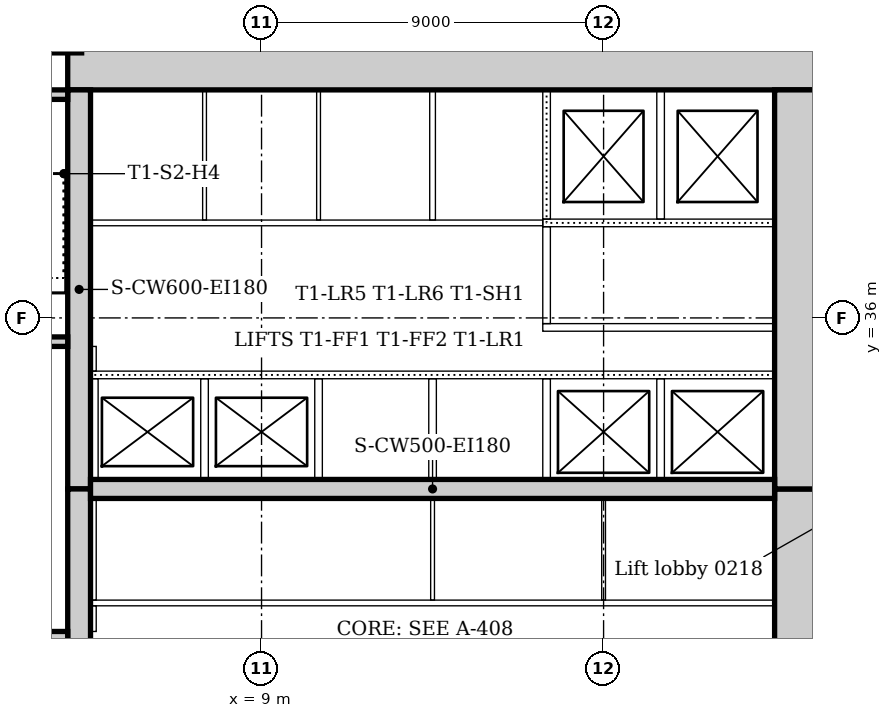
"""IFC4 building model, lengths in metres.
Left out: names, types, materials, properties, quantities, classifications, styles, units other than length and angle.
Written with IfcOpenShell. Run it as: python <this file> out.ifc"""

import sys

from ifc_helpers import new_model, si_unit, direction, frame, frame_2d, origin, origin_2d, place, context, subcontext, project, spatial, rectangle, extrude, element, fill, save


model = new_model("IFC4")
c1 = context("Model", 3, precision=1e-05, world=origin(), true_north=direction((0.0, 1.0)))
c2 = subcontext(c1, "Body", "Model", "MODEL_VIEW")
j1 = project(units=[si_unit("LENGTHUNIT", "METRE"), si_unit("PLANEANGLEUNIT", "RADIAN")], contexts=[c1])
p1 = place(None, origin())
s1 = spatial("IfcSite", under=j1, at=p1, CompositionType="ELEMENT")
p2 = place(p1, origin())
s2 = spatial("IfcBuilding", under=s1, at=p2, CompositionType="ELEMENT")
p3 = place(p2, frame((0.0, 0.0, 11.0)))
s3 = spatial("IfcBuildingStorey", under=s2, at=p3, CompositionType="ELEMENT", Elevation=11.0)
p4 = place(p3, frame((23.7, 42.6, 0.0), z_axis=(0.0, 0.0, 1.0), x_axis=(-1.0, 0.0, 0.0)))
e1 = element("IfcWall", 1, at=p4, inside=s3, PredefinedType="SOLIDWALL", context=c2, shape_type="SweptSolid", body=[
    extrude(rectangle(XDim=19.8, YDim=1.2, at=frame_2d((9.9, 0.0))), origin(), (0.0, 0.0, 1.0), 5.0),
])
p5 = place(p3, frame((23.1, 21.0, 0.0), z_axis=(0.0, 0.0, 1.0), x_axis=(0.0, 1.0, 0.0)))
e2 = element("IfcWall", 2, at=p5, inside=s3, PredefinedType="SOLIDWALL", context=c2, shape_type="SweptSolid", body=[
    extrude(rectangle(XDim=10.5, YDim=1.2, at=frame_2d((5.25, 0.0))), origin(), (0.0, 0.0, 1.0), 5.0),
])
p6 = place(p5, frame((4.35, 0.0, 0.0)))
e3 = element("IfcOpeningElement", 3, at=p6, cuts=e2, PredefinedType="OPENING", context=c2, shape_type="SweptSolid", body=[
    extrude(rectangle(XDim=1.8, YDim=2.1, at=frame_2d((0.9, 1.05))), frame((0.0, 0.61, 0.0), z_axis=(0.0, -1.0, 0.0), x_axis=(1.0, 0.0, 0.0)), (0.0, 0.0, 1.0), 1.22),
])
p7 = place(p3, frame((23.1, 31.5, 0.0), z_axis=(0.0, 0.0, 1.0), x_axis=(0.0, 1.0, 0.0)))
e4 = element("IfcWall", 4, at=p7, inside=s3, PredefinedType="SOLIDWALL", context=c2, shape_type="SweptSolid", body=[
    extrude(rectangle(XDim=10.5, YDim=1.2, at=frame_2d((5.25, 0.0))), origin(), (0.0, 0.0, 1.0), 5.0),
])
p8 = place(p7, frame((3.15, 0.0, 0.0)))
e5 = element("IfcOpeningElement", 5, at=p8, cuts=e4, PredefinedType="OPENING", context=c2, shape_type="SweptSolid", body=[
    extrude(rectangle(XDim=1.0, YDim=2.1, at=frame_2d((0.5, 1.05))), frame((0.0, 0.61, 0.0), z_axis=(0.0, -1.0, 0.0), x_axis=(1.0, 0.0, 0.0)), (0.0, 0.0, 1.0), 1.22),
])
p9 = place(p7, frame((5.2, 0.0, 0.0)))
e6 = element("IfcOpeningElement", 6, at=p9, cuts=e4, PredefinedType="OPENING", context=c2, shape_type="SweptSolid", body=[
    extrude(rectangle(XDim=1.0, YDim=2.1, at=frame_2d((0.5, 1.05))), frame((0.0, 0.61, 0.0), z_axis=(0.0, -1.0, 0.0), x_axis=(1.0, 0.0, 0.0)), (0.0, 0.0, 1.0), 1.22),
])
p10 = place(p3, frame((4.2, 42.0, 0.0), z_axis=(0.0, 0.0, 1.0), x_axis=(0.0, -1.0, 0.0)))
e7 = element("IfcWall", 7, at=p10, inside=s3, PredefinedType="SOLIDWALL", context=c2, shape_type="SweptSolid", body=[
    extrude(rectangle(XDim=10.5, YDim=0.6, at=frame_2d((5.25, 0.0))), origin(), (0.0, 0.0, 1.0), 5.0),
])
p11 = place(p10, frame((5.3, 0.0, 0.0)))
e8 = element("IfcOpeningElement", 8, at=p11, cuts=e7, PredefinedType="OPENING", context=c2, shape_type="SweptSolid", body=[
    extrude(rectangle(XDim=1.0, YDim=2.1, at=frame_2d((0.5, 1.05))), frame((0.0, 0.31, 0.0), z_axis=(0.0, -1.0, 0.0), x_axis=(1.0, 0.0, 0.0)), (0.0, 0.0, 1.0), 0.62),
])
p12 = place(p3, frame((4.2, 31.5, 0.0), z_axis=(0.0, 0.0, 1.0), x_axis=(0.0, -1.0, 0.0)))
e9 = element("IfcWall", 9, at=p12, inside=s3, PredefinedType="SOLIDWALL", context=c2, shape_type="SweptSolid", body=[
    extrude(rectangle(XDim=10.5, YDim=0.6, at=frame_2d((5.25, 0.0))), origin(), (0.0, 0.0, 1.0), 5.0),
])
p13 = place(p12, frame((4.25, 0.0, 0.0)))
e10 = element("IfcOpeningElement", 10, at=p13, cuts=e9, PredefinedType="OPENING", context=c2, shape_type="SweptSolid", body=[
    extrude(rectangle(XDim=1.0, YDim=2.1, at=frame_2d((0.5, 1.05))), frame((0.0, 0.31, 0.0), z_axis=(0.0, -1.0, 0.0), x_axis=(1.0, 0.0, 0.0)), (0.0, 0.0, 1.0), 0.62),
])
p14 = place(p3, frame((4.5, 31.5, 0.0), z_axis=(0.0, 0.0, 1.0), x_axis=(1.0, 0.0, 0.0)))
e11 = element("IfcWall", 11, at=p14, inside=s3, PredefinedType="SOLIDWALL", context=c2, shape_type="SweptSolid", body=[
    extrude(rectangle(XDim=18.0, YDim=0.5, at=frame_2d((9.0, 0.0))), origin(), (0.0, 0.0, 1.0), 5.0),
])
p15 = place(p3, frame((3.9, 27.625, 0.0), z_axis=(0.0, 0.0, 1.0), x_axis=(-1.0, 0.0, 0.0)))
e12 = element("IfcWall", 12, at=p15, inside=s3, PredefinedType="SOLIDWALL", context=c2, shape_type="SweptSolid", body=[
    extrude(rectangle(XDim=3.54, YDim=0.25, at=frame_2d((1.77, 0.0))), origin(), (0.0, 0.0, 1.0), 5.0),
])
p16 = place(p15, frame((0.4, 0.0, 0.0)))
e13 = element("IfcOpeningElement", 13, at=p16, cuts=e12, PredefinedType="OPENING", context=c2, shape_type="SweptSolid", body=[
    extrude(rectangle(XDim=1.0, YDim=2.1, at=frame_2d((0.5, 1.05))), frame((0.0, 0.135, 0.0), z_axis=(0.0, -1.0, 0.0), x_axis=(1.0, 0.0, 0.0)), (0.0, 0.0, 1.0), 0.27),
])
p17 = place(p3, frame((0.36, 35.375, 0.0), z_axis=(0.0, 0.0, 1.0), x_axis=(1.0, 0.0, 0.0)))
e14 = element("IfcWall", 14, at=p17, inside=s3, PredefinedType="SOLIDWALL", context=c2, shape_type="SweptSolid", body=[
    extrude(rectangle(XDim=3.54, YDim=0.25, at=frame_2d((1.77, 0.0))), origin(), (0.0, 0.0, 1.0), 5.0),
])
p18 = place(p17, frame((2.14, 0.0, 0.0)))
e15 = element("IfcOpeningElement", 15, at=p18, cuts=e14, PredefinedType="OPENING", context=c2, shape_type="SweptSolid", body=[
    extrude(rectangle(XDim=1.0, YDim=2.1, at=frame_2d((0.5, 1.05))), frame((0.0, 0.135, 0.0), z_axis=(0.0, -1.0, 0.0), x_axis=(1.0, 0.0, 0.0)), (0.0, 0.0, 1.0), 0.27),
])
p19 = place(p3, frame((3.9, 41.875, 0.0), z_axis=(0.0, 0.0, 1.0), x_axis=(-1.0, 0.0, 0.0)))
e16 = element("IfcWall", 16, at=p19, inside=s3, PredefinedType="SOLIDWALL", context=c2, shape_type="SweptSolid", body=[
    extrude(rectangle(XDim=3.54, YDim=0.25, at=frame_2d((1.77, 0.0))), origin(), (0.0, 0.0, 1.0), 5.0),
])
p20 = place(p3, frame((3.667, 43.574, 0.0), z_axis=(0.0, 0.0, 1.0), x_axis=(1.0, 0.0, 0.0)))
e17 = element("IfcColumn", 17, at=p20, inside=s3, PredefinedType="COLUMN", context=c2, shape_type="SweptSolid", body=[
    extrude(rectangle(XDim=1.2, YDim=1.2, at=origin_2d()), origin(), (0.0, 0.0, 1.0), 4.7),
])
p21 = place(p3, frame((16.4, 35.75, 0.0), z_axis=(0.0, 0.0, 1.0), x_axis=(1.0, 0.0, 0.0)))
e18 = element("IfcWall", 18, at=p21, inside=s3, PredefinedType="PARTITIONING", context=c2, shape_type="SweptSolid", body=[
    extrude(rectangle(XDim=6.1, YDim=0.2, at=frame_2d((3.05, 0.0))), origin(), (0.0, 0.0, 1.0), 4.7),
])
p22 = place(p3, frame((16.4, 38.5, 0.0), z_axis=(0.0, 0.0, 1.0), x_axis=(1.0, 0.0, 0.0)))
e19 = element("IfcWall", 19, at=p22, inside=s3, PredefinedType="PARTITIONING", context=c2, shape_type="SweptSolid", body=[
    extrude(rectangle(XDim=6.1, YDim=0.2, at=frame_2d((3.05, 0.0))), origin(), (0.0, 0.0, 1.0), 4.7),
])
p23 = place(p22, frame((1.0, 0.0, 0.0)))
e20 = element("IfcOpeningElement", 20, at=p23, cuts=e19, PredefinedType="OPENING", context=c2, shape_type="SweptSolid", body=[
    extrude(rectangle(XDim=1.2, YDim=2.1, at=frame_2d((0.6, 1.05))), frame((0.0, 0.11, 0.0), z_axis=(0.0, -1.0, 0.0), x_axis=(1.0, 0.0, 0.0)), (0.0, 0.0, 1.0), 0.22),
])
p24 = place(p22, frame((4.0, 0.0, 0.0)))
e21 = element("IfcOpeningElement", 21, at=p24, cuts=e19, PredefinedType="OPENING", context=c2, shape_type="SweptSolid", body=[
    extrude(rectangle(XDim=1.2, YDim=2.1, at=frame_2d((0.6, 1.05))), frame((0.0, 0.11, 0.0), z_axis=(0.0, -1.0, 0.0), x_axis=(1.0, 0.0, 0.0)), (0.0, 0.0, 1.0), 0.22),
])
p25 = place(p3, frame((16.5, 35.85, 0.0), z_axis=(0.0, 0.0, 1.0), x_axis=(0.0, 1.0, 0.0)))
e22 = element("IfcWall", 22, at=p25, inside=s3, PredefinedType="PARTITIONING", context=c2, shape_type="SweptSolid", body=[
    extrude(rectangle(XDim=2.55, YDim=0.2, at=frame_2d((1.275, 0.0))), origin(), (0.0, 0.0, 1.0), 4.7),
])
p26 = place(p3, frame((4.5, 34.5, 0.0), z_axis=(0.0, 0.0, 1.0), x_axis=(1.0, 0.0, 0.0)))
e23 = element("IfcWall", 23, at=p26, inside=s3, PredefinedType="PARTITIONING", context=c2, shape_type="SweptSolid", body=[
    extrude(rectangle(XDim=18.0, YDim=0.2, at=frame_2d((9.0, 0.0))), origin(), (0.0, 0.0, 1.0), 4.7),
])
p27 = place(p26, frame((0.95, 0.0, 0.0)))
e24 = element("IfcOpeningElement", 24, at=p27, cuts=e23, PredefinedType="OPENING", context=c2, shape_type="SweptSolid", body=[
    extrude(rectangle(XDim=1.1, YDim=2.1, at=frame_2d((0.55, 1.05))), frame((0.0, 0.11, 0.0), z_axis=(0.0, -1.0, 0.0), x_axis=(1.0, 0.0, 0.0)), (0.0, 0.0, 1.0), 0.22),
])
p28 = place(p26, frame((3.95, 0.0, 0.0)))
e25 = element("IfcOpeningElement", 25, at=p28, cuts=e23, PredefinedType="OPENING", context=c2, shape_type="SweptSolid", body=[
    extrude(rectangle(XDim=1.1, YDim=2.1, at=frame_2d((0.55, 1.05))), frame((0.0, 0.11, 0.0), z_axis=(0.0, -1.0, 0.0), x_axis=(1.0, 0.0, 0.0)), (0.0, 0.0, 1.0), 0.22),
])
p29 = place(p26, frame((12.95, 0.0, 0.0)))
e26 = element("IfcOpeningElement", 26, at=p29, cuts=e23, PredefinedType="OPENING", context=c2, shape_type="SweptSolid", body=[
    extrude(rectangle(XDim=1.1, YDim=2.1, at=frame_2d((0.55, 1.05))), frame((0.0, 0.11, 0.0), z_axis=(0.0, -1.0, 0.0), x_axis=(1.0, 0.0, 0.0)), (0.0, 0.0, 1.0), 0.22),
])
p30 = place(p26, frame((15.95, 0.0, 0.0)))
e27 = element("IfcOpeningElement", 27, at=p30, cuts=e23, PredefinedType="OPENING", context=c2, shape_type="SweptSolid", body=[
    extrude(rectangle(XDim=1.1, YDim=2.1, at=frame_2d((0.55, 1.05))), frame((0.0, 0.11, 0.0), z_axis=(0.0, -1.0, 0.0), x_axis=(1.0, 0.0, 0.0)), (0.0, 0.0, 1.0), 0.22),
])
for number, where, z_axis, x_axis in (
    (28, (16.5, 38.6, 0.0), (0.0, 0.0, 1.0), (0.0, 1.0, 0.0)),
    (29, (19.5, 38.6, 0.0), (0.0, 0.0, 1.0), (0.0, 1.0, 0.0)),
):
    element("IfcWall", number, at=place(p3, frame(where, z_axis=z_axis, x_axis=x_axis)), inside=s3, PredefinedType="PARTITIONING", context=c2, shape_type="SweptSolid", body=[
        extrude(rectangle(XDim=3.4, YDim=0.2, at=frame_2d((1.7, 0.0))), origin(), (0.0, 0.0, 1.0), 4.7),
    ])
for number, where, z_axis, x_axis in (
    (30, (4.6, 31.75, 0.0), (0.0, 0.0, 1.0), (0.0, 1.0, 0.0)),
    (31, (7.5, 31.75, 0.0), (0.0, 0.0, 1.0), (0.0, 1.0, 0.0)),
    (32, (10.5, 31.75, 0.0), (0.0, 0.0, 1.0), (0.0, 1.0, 0.0)),
    (33, (13.5, 31.75, 0.0), (0.0, 0.0, 1.0), (0.0, 1.0, 0.0)),
    (34, (16.5, 31.75, 0.0), (0.0, 0.0, 1.0), (0.0, 1.0, 0.0)),
    (35, (19.5, 31.75, 0.0), (0.0, 0.0, 1.0), (0.0, 1.0, 0.0)),
):
    element("IfcWall", number, at=place(p3, frame(where, z_axis=z_axis, x_axis=x_axis)), inside=s3, PredefinedType="PARTITIONING", context=c2, shape_type="SweptSolid", body=[
        extrude(rectangle(XDim=2.65, YDim=0.2, at=frame_2d((1.325, 0.0))), origin(), (0.0, 0.0, 1.0), 4.7),
    ])
p31 = place(p3, frame((4.5, 28.5, 0.0), z_axis=(0.0, 0.0, 1.0), x_axis=(1.0, 0.0, 0.0)))
e36 = element("IfcWall", 36, at=p31, inside=s3, PredefinedType="PARTITIONING", context=c2, shape_type="SweptSolid", body=[
    extrude(rectangle(XDim=18.0, YDim=0.15, at=frame_2d((9.0, 0.0))), origin(), (0.0, 0.0, 1.0), 4.7),
])
p32 = place(p31, frame((4.1, 0.0, 0.0)))
e37 = element("IfcOpeningElement", 37, at=p32, cuts=e36, PredefinedType="OPENING", context=c2, shape_type="SweptSolid", body=[
    extrude(rectangle(XDim=0.9, YDim=2.1, at=frame_2d((0.45, 1.05))), frame((0.0, 0.085, 0.0), z_axis=(0.0, -1.0, 0.0), x_axis=(1.0, 0.0, 0.0)), (0.0, 0.0, 1.0), 0.17),
])
p33 = place(p31, frame((10.8, 0.0, 0.0)))
e38 = element("IfcOpeningElement", 38, at=p33, cuts=e36, PredefinedType="OPENING", context=c2, shape_type="SweptSolid", body=[
    extrude(rectangle(XDim=0.9, YDim=2.1, at=frame_2d((0.45, 1.05))), frame((0.0, 0.085, 0.0), z_axis=(0.0, -1.0, 0.0), x_axis=(1.0, 0.0, 0.0)), (0.0, 0.0, 1.0), 0.17),
])
p34 = place(p31, frame((15.2, 0.0, 0.0)))
e39 = element("IfcOpeningElement", 39, at=p34, cuts=e36, PredefinedType="OPENING", context=c2, shape_type="SweptSolid", body=[
    extrude(rectangle(XDim=0.9, YDim=2.1, at=frame_2d((0.45, 1.05))), frame((0.0, 0.085, 0.0), z_axis=(0.0, -1.0, 0.0), x_axis=(1.0, 0.0, 0.0)), (0.0, 0.0, 1.0), 0.17),
])
p35 = place(p3, frame((4.5, 38.5, 0.0), z_axis=(0.0, 0.0, 1.0), x_axis=(1.0, 0.0, 0.0)))
e40 = element("IfcWall", 40, at=p35, inside=s3, PredefinedType="PARTITIONING", context=c2, shape_type="SweptSolid", body=[
    extrude(rectangle(XDim=11.9, YDim=0.15, at=frame_2d((5.95, 0.0))), origin(), (0.0, 0.0, 1.0), 4.7),
])
p36 = place(p35, frame((1.1, 0.0, 0.0)))
e41 = element("IfcOpeningElement", 41, at=p36, cuts=e40, PredefinedType="OPENING", context=c2, shape_type="SweptSolid", body=[
    extrude(rectangle(XDim=0.9, YDim=2.1, at=frame_2d((0.45, 1.05))), frame((0.0, 0.085, 0.0), z_axis=(0.0, -1.0, 0.0), x_axis=(1.0, 0.0, 0.0)), (0.0, 0.0, 1.0), 0.17),
])
p37 = place(p35, frame((4.05, 0.0, 0.0)))
e42 = element("IfcOpeningElement", 42, at=p37, cuts=e40, PredefinedType="OPENING", context=c2, shape_type="SweptSolid", body=[
    extrude(rectangle(XDim=0.9, YDim=2.1, at=frame_2d((0.45, 1.05))), frame((0.0, 0.085, 0.0), z_axis=(0.0, -1.0, 0.0), x_axis=(1.0, 0.0, 0.0)), (0.0, 0.0, 1.0), 0.17),
])
p38 = place(p35, frame((7.05, 0.0, 0.0)))
e43 = element("IfcOpeningElement", 43, at=p38, cuts=e40, PredefinedType="OPENING", context=c2, shape_type="SweptSolid", body=[
    extrude(rectangle(XDim=0.9, YDim=2.1, at=frame_2d((0.45, 1.05))), frame((0.0, 0.085, 0.0), z_axis=(0.0, -1.0, 0.0), x_axis=(1.0, 0.0, 0.0)), (0.0, 0.0, 1.0), 0.17),
])
p39 = place(p35, frame((9.95, 0.0, 0.0)))
e44 = element("IfcOpeningElement", 44, at=p39, cuts=e40, PredefinedType="OPENING", context=c2, shape_type="SweptSolid", body=[
    extrude(rectangle(XDim=0.8, YDim=2.1, at=frame_2d((0.4, 1.05))), frame((0.0, 0.085, 0.0), z_axis=(0.0, -1.0, 0.0), x_axis=(1.0, 0.0, 0.0)), (0.0, 0.0, 1.0), 0.17),
])
p40 = place(p3, frame((4.575, 27.75, 0.0), z_axis=(0.0, 0.0, 1.0), x_axis=(0.0, 1.0, 0.0)))
e45 = element("IfcWall", 45, at=p40, inside=s3, PredefinedType="PARTITIONING", context=c2, shape_type="SweptSolid", body=[
    extrude(rectangle(XDim=0.675, YDim=0.15, at=frame_2d((0.338, 0.0))), origin(), (0.0, 0.0, 1.0), 4.7),
])
p41 = place(p3, frame((4.575, 28.575, 0.0), z_axis=(0.0, 0.0, 1.0), x_axis=(0.0, 1.0, 0.0)))
e46 = element("IfcWall", 46, at=p41, inside=s3, PredefinedType="PARTITIONING", context=c2, shape_type="SweptSolid", body=[
    extrude(rectangle(XDim=2.675, YDim=0.15, at=frame_2d((1.337, 0.0))), origin(), (0.0, 0.0, 1.0), 4.7),
])
p42 = place(p3, frame((4.575, 34.6, 0.0), z_axis=(0.0, 0.0, 1.0), x_axis=(0.0, 1.0, 0.0)))
e47 = element("IfcWall", 47, at=p42, inside=s3, PredefinedType="PARTITIONING", context=c2, shape_type="SweptSolid", body=[
    extrude(rectangle(XDim=0.65, YDim=0.15, at=frame_2d((0.325, 0.0))), origin(), (0.0, 0.0, 1.0), 4.7),
])
p43 = place(p3, frame((13.5, 38.575, 0.0), z_axis=(0.0, 0.0, 1.0), x_axis=(0.0, 1.0, 0.0)))
e48 = element("IfcWall", 48, at=p43, inside=s3, PredefinedType="PARTITIONING", context=c2, shape_type="SweptSolid", body=[
    extrude(rectangle(XDim=3.425, YDim=0.15, at=frame_2d((1.712, 0.0))), origin(), (0.0, 0.0, 1.0), 4.7),
])
for number, where, z_axis, x_axis in (
    (49, (7.5, 38.575, 0.0), (0.0, 0.0, 1.0), (0.0, 1.0, 0.0)),
    (50, (10.5, 38.575, 0.0), (0.0, 0.0, 1.0), (0.0, 1.0, 0.0)),
):
    element("IfcWall", number, at=place(p3, frame(where, z_axis=z_axis, x_axis=x_axis)), inside=s3, PredefinedType="PARTITIONING", context=c2, shape_type="SweptSolid", body=[
        extrude(rectangle(XDim=3.425, YDim=0.1, at=frame_2d((1.712, 0.0))), origin(), (0.0, 0.0, 1.0), 4.7),
    ])
for number, where, z_axis, x_axis in (
    (51, (13.5, 28.575, 0.0), (0.0, 0.0, 1.0), (0.0, 1.0, 0.0)),
    (52, (18.0, 28.575, 0.0), (0.0, 0.0, 1.0), (0.0, 1.0, 0.0)),
):
    element("IfcWall", number, at=place(p3, frame(where, z_axis=z_axis, x_axis=x_axis)), inside=s3, PredefinedType="PARTITIONING", context=c2, shape_type="SweptSolid", body=[
        extrude(rectangle(XDim=2.675, YDim=0.1, at=frame_2d((1.337, 0.0))), origin(), (0.0, 0.0, 1.0), 4.7),
    ])
p44 = place(p11, frame((1.0, 0.0, 0.0), z_axis=(0.0, 0.0, 1.0), x_axis=(-1.0, 0.0, 0.0)))
e53 = element("IfcDoor", 53, at=p44, inside=s3, OperationType="SINGLE_SWING_LEFT", PredefinedType="DOOR", context=c2, shape_type="SweptSolid", body=[
    extrude(rectangle(XDim=1.0, YDim=2.1, at=frame_2d((0.5, 1.05))), frame((0.0, 0.025, 0.0), z_axis=(0.0, -1.0, 0.0), x_axis=(1.0, 0.0, 0.0)), (0.0, 0.0, 1.0), 0.05),
])
fill(e8, e53)
p45 = place(p27, origin())
e54 = element("IfcDoor", 54, at=p45, inside=s3, OperationType="SLIDING_TO_LEFT", PredefinedType="DOOR", context=c2, shape_type="SweptSolid", body=[
    extrude(rectangle(XDim=1.1, YDim=2.1, at=frame_2d((0.55, 1.05))), frame((0.0, 0.025, 0.0), z_axis=(0.0, -1.0, 0.0), x_axis=(1.0, 0.0, 0.0)), (0.0, 0.0, 1.0), 0.05),
])
fill(e24, e54)
p46 = place(p28, origin())
e55 = element("IfcDoor", 55, at=p46, inside=s3, OperationType="SLIDING_TO_LEFT", PredefinedType="DOOR", context=c2, shape_type="SweptSolid", body=[
    extrude(rectangle(XDim=1.1, YDim=2.1, at=frame_2d((0.55, 1.05))), frame((0.0, 0.025, 0.0), z_axis=(0.0, -1.0, 0.0), x_axis=(1.0, 0.0, 0.0)), (0.0, 0.0, 1.0), 0.05),
])
fill(e25, e55)
p47 = place(p29, origin())
e56 = element("IfcDoor", 56, at=p47, inside=s3, OperationType="SLIDING_TO_LEFT", PredefinedType="DOOR", context=c2, shape_type="SweptSolid", body=[
    extrude(rectangle(XDim=1.1, YDim=2.1, at=frame_2d((0.55, 1.05))), frame((0.0, 0.025, 0.0), z_axis=(0.0, -1.0, 0.0), x_axis=(1.0, 0.0, 0.0)), (0.0, 0.0, 1.0), 0.05),
])
fill(e26, e56)
p48 = place(p30, origin())
e57 = element("IfcDoor", 57, at=p48, inside=s3, OperationType="SLIDING_TO_LEFT", PredefinedType="DOOR", context=c2, shape_type="SweptSolid", body=[
    extrude(rectangle(XDim=1.1, YDim=2.1, at=frame_2d((0.55, 1.05))), frame((0.0, 0.025, 0.0), z_axis=(0.0, -1.0, 0.0), x_axis=(1.0, 0.0, 0.0)), (0.0, 0.0, 1.0), 0.05),
])
fill(e27, e57)
p49 = place(p23, origin())
e58 = element("IfcDoor", 58, at=p49, inside=s3, OperationType="SLIDING_TO_LEFT", PredefinedType="DOOR", context=c2, shape_type="SweptSolid", body=[
    extrude(rectangle(XDim=1.2, YDim=2.1, at=frame_2d((0.6, 1.05))), frame((0.0, 0.025, 0.0), z_axis=(0.0, -1.0, 0.0), x_axis=(1.0, 0.0, 0.0)), (0.0, 0.0, 1.0), 0.05),
])
fill(e20, e58)
p50 = place(p24, origin())
e59 = element("IfcDoor", 59, at=p50, inside=s3, OperationType="SLIDING_TO_LEFT", PredefinedType="DOOR", context=c2, shape_type="SweptSolid", body=[
    extrude(rectangle(XDim=1.2, YDim=2.1, at=frame_2d((0.6, 1.05))), frame((0.0, 0.025, 0.0), z_axis=(0.0, -1.0, 0.0), x_axis=(1.0, 0.0, 0.0)), (0.0, 0.0, 1.0), 0.05),
])
fill(e21, e59)
p51 = place(p8, frame((1.0, 0.0, 0.0), z_axis=(0.0, 0.0, 1.0), x_axis=(-1.0, 0.0, 0.0)))
e60 = element("IfcDoor", 60, at=p51, inside=s3, OperationType="SINGLE_SWING_RIGHT", PredefinedType="DOOR", context=c2, shape_type="SweptSolid", body=[
    extrude(rectangle(XDim=1.0, YDim=2.1, at=frame_2d((0.5, 1.05))), frame((0.0, 0.025, 0.0), z_axis=(0.0, -1.0, 0.0), x_axis=(1.0, 0.0, 0.0)), (0.0, 0.0, 1.0), 0.05),
])
fill(e5, e60)
p52 = place(p9, frame((1.0, 0.0, 0.0), z_axis=(0.0, 0.0, 1.0), x_axis=(-1.0, 0.0, 0.0)))
e61 = element("IfcDoor", 61, at=p52, inside=s3, OperationType="SINGLE_SWING_LEFT", PredefinedType="DOOR", context=c2, shape_type="SweptSolid", body=[
    extrude(rectangle(XDim=1.0, YDim=2.1, at=frame_2d((0.5, 1.05))), frame((0.0, 0.025, 0.0), z_axis=(0.0, -1.0, 0.0), x_axis=(1.0, 0.0, 0.0)), (0.0, 0.0, 1.0), 0.05),
])
fill(e6, e61)
p53 = place(p32, origin())
e62 = element("IfcDoor", 62, at=p53, inside=s3, OperationType="SINGLE_SWING_RIGHT", PredefinedType="DOOR", context=c2, shape_type="SweptSolid", body=[
    extrude(rectangle(XDim=0.9, YDim=2.1, at=frame_2d((0.45, 1.05))), frame((0.0, 0.025, 0.0), z_axis=(0.0, -1.0, 0.0), x_axis=(1.0, 0.0, 0.0)), (0.0, 0.0, 1.0), 0.05),
])
fill(e37, e62)
p54 = place(p33, origin())
e63 = element("IfcDoor", 63, at=p54, inside=s3, OperationType="SINGLE_SWING_RIGHT", PredefinedType="DOOR", context=c2, shape_type="SweptSolid", body=[
    extrude(rectangle(XDim=0.9, YDim=2.1, at=frame_2d((0.45, 1.05))), frame((0.0, 0.025, 0.0), z_axis=(0.0, -1.0, 0.0), x_axis=(1.0, 0.0, 0.0)), (0.0, 0.0, 1.0), 0.05),
])
fill(e38, e63)
p55 = place(p34, origin())
e64 = element("IfcDoor", 64, at=p55, inside=s3, OperationType="SINGLE_SWING_LEFT", PredefinedType="DOOR", context=c2, shape_type="SweptSolid", body=[
    extrude(rectangle(XDim=0.9, YDim=2.1, at=frame_2d((0.45, 1.05))), frame((0.0, 0.025, 0.0), z_axis=(0.0, -1.0, 0.0), x_axis=(1.0, 0.0, 0.0)), (0.0, 0.0, 1.0), 0.05),
])
fill(e39, e64)
p56 = place(p36, origin())
e65 = element("IfcDoor", 65, at=p56, inside=s3, OperationType="SINGLE_SWING_RIGHT", PredefinedType="DOOR", context=c2, shape_type="SweptSolid", body=[
    extrude(rectangle(XDim=0.9, YDim=2.1, at=frame_2d((0.45, 1.05))), frame((0.0, 0.025, 0.0), z_axis=(0.0, -1.0, 0.0), x_axis=(1.0, 0.0, 0.0)), (0.0, 0.0, 1.0), 0.05),
])
fill(e41, e65)
p57 = place(p37, origin())
e66 = element("IfcDoor", 66, at=p57, inside=s3, OperationType="SINGLE_SWING_RIGHT", PredefinedType="DOOR", context=c2, shape_type="SweptSolid", body=[
    extrude(rectangle(XDim=0.9, YDim=2.1, at=frame_2d((0.45, 1.05))), frame((0.0, 0.025, 0.0), z_axis=(0.0, -1.0, 0.0), x_axis=(1.0, 0.0, 0.0)), (0.0, 0.0, 1.0), 0.05),
])
fill(e42, e66)
p58 = place(p38, origin())
e67 = element("IfcDoor", 67, at=p58, inside=s3, OperationType="SINGLE_SWING_RIGHT", PredefinedType="DOOR", context=c2, shape_type="SweptSolid", body=[
    extrude(rectangle(XDim=0.9, YDim=2.1, at=frame_2d((0.45, 1.05))), frame((0.0, 0.025, 0.0), z_axis=(0.0, -1.0, 0.0), x_axis=(1.0, 0.0, 0.0)), (0.0, 0.0, 1.0), 0.05),
])
fill(e43, e67)
p59 = place(p39, origin())
e68 = element("IfcDoor", 68, at=p59, inside=s3, OperationType="SINGLE_SWING_LEFT", PredefinedType="DOOR", context=c2, shape_type="SweptSolid", body=[
    extrude(rectangle(XDim=0.8, YDim=2.1, at=frame_2d((0.4, 1.05))), frame((0.0, 0.025, 0.0), z_axis=(0.0, -1.0, 0.0), x_axis=(1.0, 0.0, 0.0)), (0.0, 0.0, 1.0), 0.05),
])
fill(e44, e68)
save(model, sys.argv[1])
